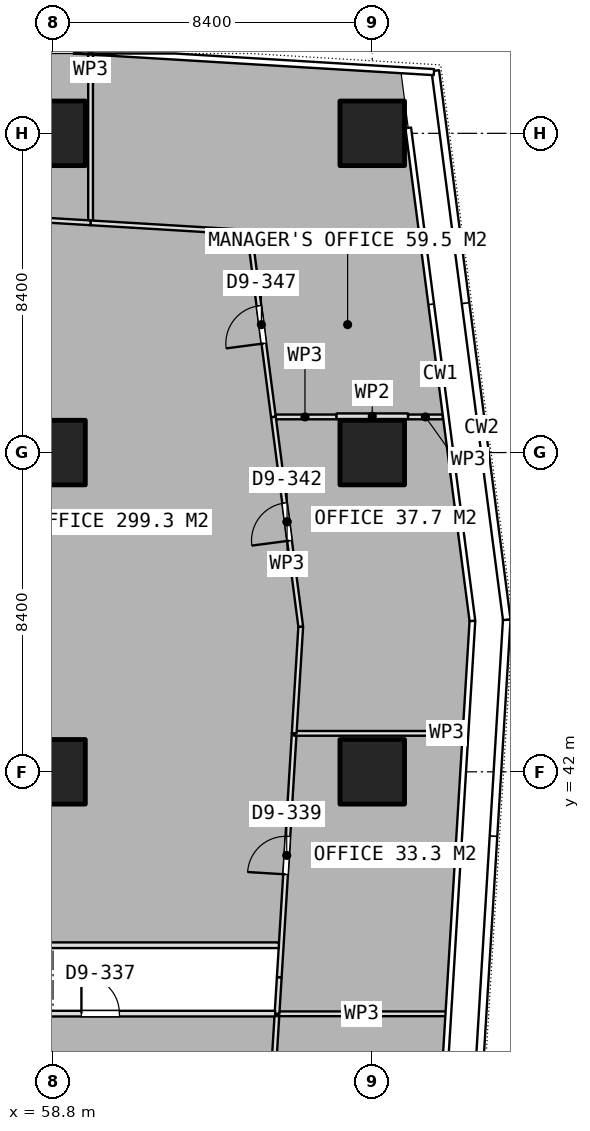
"""IFC4 building model, lengths in metres.
Left out: names, types, materials, properties, quantities, classifications, styles, units other than length and angle.
Written with IfcOpenShell. Run it as: python <this file> out.ifc"""

import sys

from ifc_helpers import new_model, si_unit, direction, frame, frame_2d, origin, origin_2d, place, context, subcontext, project, spatial, rectangle, extrude, element, fill, save


model = new_model("IFC4")
c1 = context("Model", 3, precision=1e-05, world=origin(), true_north=direction((0.0, 1.0)))
c2 = subcontext(c1, "Body", "Model", "MODEL_VIEW")
j1 = project(units=[si_unit("LENGTHUNIT", "METRE"), si_unit("PLANEANGLEUNIT", "RADIAN")], contexts=[c1])
p1 = place(None, origin())
s1 = spatial("IfcSite", under=j1, at=p1, CompositionType="ELEMENT")
p2 = place(p1, origin())
s2 = spatial("IfcBuilding", under=s1, at=p2, CompositionType="ELEMENT")
p3 = place(p2, frame((0.0, 0.0, 102.8)))
s3 = spatial("IfcBuildingStorey", under=s2, at=p3, CompositionType="ELEMENT", Elevation=102.8)
for number, where, z_axis, x_axis in (
    (1, (58.8, 42.0, 0.0), (0.0, 0.0, 1.0), (1.0, 0.0, 0.0)),
    (2, (58.8, 50.4, 0.0), (0.0, 0.0, 1.0), (1.0, 0.0, 0.0)),
    (3, (58.8, 58.8, 0.0), (0.0, 0.0, 1.0), (1.0, 0.0, 0.0)),
    (4, (67.2, 42.0, 0.0), (0.0, 0.0, 1.0), (1.0, 0.0, 0.0)),
    (5, (67.2, 50.4, 0.0), (0.0, 0.0, 1.0), (1.0, 0.0, 0.0)),
    (6, (67.2, 58.8, 0.0), (0.0, 0.0, 1.0), (1.0, 0.0, 0.0)),
):
    element("IfcColumn", number, at=place(p3, frame(where, z_axis=z_axis, x_axis=x_axis)), inside=s3, PredefinedType="COLUMN", context=c2, shape_type="SweptSolid", body=[
        extrude(rectangle(XDim=1.7, YDim=1.7, at=origin_2d()), origin(), (0.0, 0.0, 1.0), 3.75),
    ])
p4 = place(p3, frame((64.114, 26.167, 0.0), z_axis=(0.0, 0.0, 1.0), x_axis=(0.061165020441, 0.998127667322, 0.0)))
e7 = element("IfcWall", 7, at=p4, inside=s3, PredefinedType="PARTITIONING", context=c2, shape_type="SweptSolid", body=[
    extrude(rectangle(XDim=9.484, YDim=0.125, at=frame_2d((4.742, 0.0))), origin(), (0.0, 0.0, 1.0), 3.5),
])
p5 = place(p4, frame((4.242, 0.0, 0.0)))
e8 = element("IfcOpeningElement", 8, at=p5, cuts=e7, PredefinedType="OPENING", context=c2, shape_type="SweptSolid", body=[
    extrude(rectangle(XDim=1.0, YDim=2.1, at=frame_2d((0.5, 1.05))), frame((0.0, 0.073, 0.0), z_axis=(0.0, -1.0, 0.0), x_axis=(1.0, 0.0, 0.0)), (0.0, 0.0, 1.0), 0.145),
])
p6 = place(p3, frame((64.694, 35.633, 0.0), z_axis=(0.0, 0.0, 1.0), x_axis=(1.0, 0.0, 0.0)))
e9 = element("IfcWall", 9, at=p6, inside=s3, PredefinedType="PARTITIONING", context=c2, shape_type="SweptSolid", body=[
    extrude(rectangle(XDim=4.458, YDim=0.125, at=frame_2d((2.229, 0.0))), origin(), (0.0, 0.0, 1.0), 3.5),
])
p7 = place(p3, frame((64.753, 36.589, 0.0), z_axis=(0.0, 0.0, 1.0), x_axis=(0.061083835669, 0.998132638991, 0.0)))
e10 = element("IfcWall", 10, at=p7, inside=s3, PredefinedType="PARTITIONING", context=c2, shape_type="SweptSolid", body=[
    extrude(rectangle(XDim=6.435, YDim=0.125, at=frame_2d((3.217, 0.0))), origin(), (0.0, 0.0, 1.0), 3.5),
])
p8 = place(p7, frame((2.718, 0.0, 0.0)))
e11 = element("IfcOpeningElement", 11, at=p8, cuts=e10, PredefinedType="OPENING", context=c2, shape_type="SweptSolid", body=[
    extrude(rectangle(XDim=1.0, YDim=2.1, at=frame_2d((0.5, 1.05))), frame((0.0, 0.073, 0.0), z_axis=(0.0, -1.0, 0.0), x_axis=(1.0, 0.0, 0.0)), (0.0, 0.0, 1.0), 0.145),
])
p9 = place(p3, frame((65.146, 43.012, 0.0), z_axis=(0.0, 0.0, 1.0), x_axis=(1.0, 0.0, 0.0)))
e12 = element("IfcWall", 12, at=p9, inside=s3, PredefinedType="PARTITIONING", context=c2, shape_type="SweptSolid", body=[
    extrude(rectangle(XDim=4.458, YDim=0.125, at=frame_2d((2.229, 0.0))), origin(), (0.0, 0.0, 1.0), 3.5),
])
p10 = place(p3, frame((64.694, 35.634, 0.0), z_axis=(0.0, 0.0, 1.0), x_axis=(0.061488745964, 0.998107776806, 0.0)))
e13 = element("IfcWall", 13, at=p10, inside=s3, PredefinedType="PARTITIONING", context=c2, shape_type="SweptSolid", body=[
    extrude(rectangle(XDim=0.957, YDim=0.125, at=frame_2d((0.479, 0.0))), origin(), (0.0, 0.0, 1.0), 3.5),
])
p11 = place(p3, frame((64.599, 51.338, 0.0), z_axis=(0.0, 0.0, 1.0), x_axis=(1.0, 0.0, 0.0)))
e14 = element("IfcWall", 14, at=p11, inside=s3, PredefinedType="PARTITIONING", context=c2, shape_type="SweptSolid", body=[
    extrude(rectangle(XDim=1.661, YDim=0.125, at=frame_2d((0.831, 0.0))), origin(), (0.0, 0.0, 1.0), 3.5),
])
p12 = place(p3, frame((68.14, 51.338, 0.0), z_axis=(0.0, 0.0, 1.0), x_axis=(1.0, 0.0, 0.0)))
e15 = element("IfcWall", 15, at=p12, inside=s3, PredefinedType="PARTITIONING", context=c2, shape_type="SweptSolid", body=[
    extrude(rectangle(XDim=0.917, YDim=0.125, at=frame_2d((0.458, 0.0))), origin(), (0.0, 0.0, 1.0), 3.5),
])
p13 = place(p3, frame((65.146, 43.013, 0.0), z_axis=(0.0, 0.0, 1.0), x_axis=(0.061242528703, 0.998122914614, 0.0)))
e16 = element("IfcWall", 16, at=p13, inside=s3, PredefinedType="PARTITIONING", context=c2, shape_type="SweptSolid", body=[
    extrude(rectangle(XDim=2.811, YDim=0.125, at=frame_2d((1.405, 0.0))), origin(), (0.0, 0.0, 1.0), 3.5),
])
p14 = place(p3, frame((65.318, 45.818, 0.0), z_axis=(0.0, 0.0, 1.0), x_axis=(-0.129166678345, 0.991622896673, 0.0)))
e17 = element("IfcWall", 17, at=p14, inside=s3, PredefinedType="PARTITIONING", context=c2, shape_type="SweptSolid", body=[
    extrude(rectangle(XDim=5.566, YDim=0.125, at=frame_2d((2.783, 0.0))), origin(), (0.0, 0.0, 1.0), 3.5),
])
p15 = place(p14, frame((2.283, 0.0, 0.0)))
e18 = element("IfcOpeningElement", 18, at=p15, cuts=e17, PredefinedType="OPENING", context=c2, shape_type="SweptSolid", body=[
    extrude(rectangle(XDim=1.0, YDim=2.1, at=frame_2d((0.5, 1.05))), frame((0.0, 0.073, 0.0), z_axis=(0.0, -1.0, 0.0), x_axis=(1.0, 0.0, 0.0)), (0.0, 0.0, 1.0), 0.145),
])
p16 = place(p3, frame((59.788, 56.445, 0.0), z_axis=(0.0, 0.0, 1.0), x_axis=(0.0, 1.0, 0.0)))
e19 = element("IfcWall", 19, at=p16, inside=s3, PredefinedType="PARTITIONING", context=c2, shape_type="SweptSolid", body=[
    extrude(rectangle(XDim=4.458, YDim=0.125, at=frame_2d((2.229, 0.0))), origin(), (0.0, 0.0, 1.0), 3.5),
])
p17 = place(p3, frame((64.599, 51.339, 0.0), z_axis=(0.0, 0.0, 1.0), x_axis=(-0.129102549566, 0.991631247841, 0.0)))
e20 = element("IfcWall", 20, at=p17, inside=s3, PredefinedType="PARTITIONING", context=c2, shape_type="SweptSolid", body=[
    extrude(rectangle(XDim=4.896, YDim=0.125, at=frame_2d((2.448, 0.0))), origin(), (0.0, 0.0, 1.0), 3.5),
])
p18 = place(p17, frame((1.948, 0.0, 0.0)))
e21 = element("IfcOpeningElement", 21, at=p18, cuts=e20, PredefinedType="OPENING", context=c2, shape_type="SweptSolid", body=[
    extrude(rectangle(XDim=1.0, YDim=2.1, at=frame_2d((0.5, 1.05))), frame((0.0, 0.073, 0.0), z_axis=(0.0, -1.0, 0.0), x_axis=(1.0, 0.0, 0.0)), (0.0, 0.0, 1.0), 0.145),
])
p19 = place(p3, frame((63.967, 56.194, 0.0), z_axis=(0.0, 0.0, 1.0), x_axis=(-0.998201427139, 0.059949235678, 0.0)))
e22 = element("IfcWall", 22, at=p19, inside=s3, PredefinedType="PARTITIONING", context=c2, shape_type="SweptSolid", body=[
    extrude(rectangle(XDim=4.187, YDim=0.125, at=frame_2d((2.093, 0.0))), origin(), (0.0, 0.0, 1.0), 3.5),
])
p20 = place(p3, frame((59.787, 56.445, 0.0), z_axis=(0.0, 0.0, 1.0), x_axis=(-0.998194005673, 0.060072681298, 0.0)))
e23 = element("IfcWall", 23, at=p20, inside=s3, PredefinedType="PARTITIONING", context=c2, shape_type="SweptSolid", body=[
    extrude(rectangle(XDim=8.307, YDim=0.125, at=frame_2d((4.153, 0.0))), origin(), (0.0, 0.0, 1.0), 3.5),
])
p21 = place(p20, frame((3.654, 0.0, 0.0)))
e24 = element("IfcOpeningElement", 24, at=p21, cuts=e23, PredefinedType="OPENING", context=c2, shape_type="SweptSolid", body=[
    extrude(rectangle(XDim=1.0, YDim=2.1, at=frame_2d((0.5, 1.05))), frame((0.0, 0.073, 0.0), z_axis=(0.0, -1.0, 0.0), x_axis=(1.0, 0.0, 0.0)), (0.0, 0.0, 1.0), 0.145),
])
p22 = place(p3, frame((66.26, 51.355, 0.0), z_axis=(0.0, 0.0, 1.0), x_axis=(1.0, 0.0, 0.0)))
e25 = element("IfcWall", 25, at=p22, inside=s3, PredefinedType="PARTITIONING", context=c2, shape_type="SweptSolid", body=[
    extrude(rectangle(XDim=1.88, YDim=0.15, at=frame_2d((0.94, 0.0))), origin(), (0.0, 0.0, 1.0), 3.5),
])
p23 = place(p3, frame((64.742, 37.437, 0.0), z_axis=(0.0, 0.0, 1.0), x_axis=(-1.0, 0.0, 0.0)))
e26 = element("IfcWall", 26, at=p23, inside=s3, PredefinedType="PARTITIONING", context=c2, shape_type="SweptSolid", body=[
    extrude(rectangle(XDim=11.542, YDim=0.15, at=frame_2d((5.771, 0.0))), origin(), (0.0, 0.0, 1.0), 3.5),
])
p24 = place(p3, frame((53.2, 35.637, 0.0), z_axis=(0.0, 0.0, 1.0), x_axis=(1.0, 0.0, 0.0)))
e27 = element("IfcWall", 27, at=p24, inside=s3, PredefinedType="PARTITIONING", context=c2, shape_type="SweptSolid", body=[
    extrude(rectangle(XDim=11.445, YDim=0.15, at=frame_2d((5.723, 0.0))), origin(), (0.0, 0.0, 1.0), 3.5),
])
p25 = place(p24, frame((6.347, 0.0, 0.0)))
e28 = element("IfcOpeningElement", 28, at=p25, cuts=e27, PredefinedType="OPENING", context=c2, shape_type="SweptSolid", body=[
    extrude(rectangle(XDim=1.0, YDim=2.1, at=frame_2d((0.5, 1.05))), frame((0.0, 0.085, 0.0), z_axis=(0.0, -1.0, 0.0), x_axis=(1.0, 0.0, 0.0)), (0.0, 0.0, 1.0), 0.17),
])
p26 = place(p8, origin())
e29 = element("IfcDoor", 29, at=p26, inside=s3, OperationType="SINGLE_SWING_LEFT", PredefinedType="DOOR", context=c2, shape_type="SweptSolid", body=[
    extrude(rectangle(XDim=1.0, YDim=2.1, at=frame_2d((0.5, 1.05))), frame((0.0, 0.025, 0.0), z_axis=(0.0, -1.0, 0.0), x_axis=(1.0, 0.0, 0.0)), (0.0, 0.0, 1.0), 0.05),
])
fill(e11, e29)
p27 = place(p15, origin())
e30 = element("IfcDoor", 30, at=p27, inside=s3, OperationType="SINGLE_SWING_LEFT", PredefinedType="DOOR", context=c2, shape_type="SweptSolid", body=[
    extrude(rectangle(XDim=1.0, YDim=2.1, at=frame_2d((0.5, 1.05))), frame((0.0, 0.025, 0.0), z_axis=(0.0, -1.0, 0.0), x_axis=(1.0, 0.0, 0.0)), (0.0, 0.0, 1.0), 0.05),
])
fill(e18, e30)
p28 = place(p18, origin())
e31 = element("IfcDoor", 31, at=p28, inside=s3, OperationType="SINGLE_SWING_LEFT", PredefinedType="DOOR", context=c2, shape_type="SweptSolid", body=[
    extrude(rectangle(XDim=1.0, YDim=2.1, at=frame_2d((0.5, 1.05))), frame((0.0, 0.025, 0.0), z_axis=(0.0, -1.0, 0.0), x_axis=(1.0, 0.0, 0.0)), (0.0, 0.0, 1.0), 0.05),
])
fill(e21, e31)
p29 = place(p25, origin())
e32 = element("IfcDoor", 32, at=p29, inside=s3, OperationType="SINGLE_SWING_LEFT", PredefinedType="DOOR", context=c2, shape_type="SweptSolid", body=[
    extrude(rectangle(XDim=1.0, YDim=2.1, at=frame_2d((0.5, 1.05))), frame((0.0, 0.025, 0.0), z_axis=(0.0, -1.0, 0.0), x_axis=(1.0, 0.0, 0.0)), (0.0, 0.0, 1.0), 0.05),
])
fill(e28, e32)
save(model, sys.argv[1])
